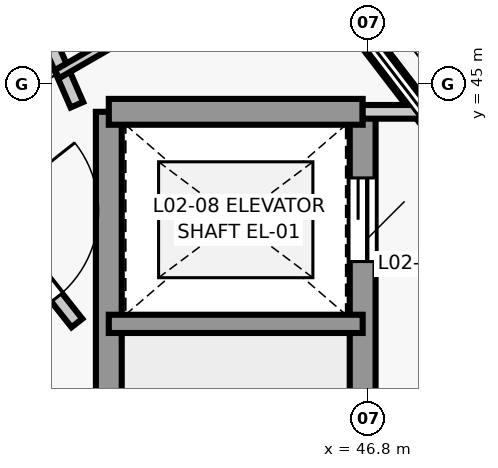
"""IFC4 building model, lengths in metres.
Left out: names, types, materials, properties, quantities, classifications, styles, units other than length and angle.
Written with IfcOpenShell. Run it as: python <this file> out.ifc"""

import sys

from ifc_helpers import new_model, si_unit, direction, frame, frame_2d, origin, place, context, subcontext, project, spatial, rectangle, extrude, element, fill, save


model = new_model("IFC4")
c1 = context("Model", 3, precision=1e-05, world=origin(), true_north=direction((0.0, 1.0)))
c2 = subcontext(c1, "Body", "Model", "MODEL_VIEW")
j1 = project(units=[si_unit("LENGTHUNIT", "METRE"), si_unit("PLANEANGLEUNIT", "RADIAN")], contexts=[c1])
p1 = place(None, origin())
s1 = spatial("IfcSite", under=j1, at=p1, CompositionType="ELEMENT")
p2 = place(p1, origin())
s2 = spatial("IfcBuilding", under=s1, at=p2, CompositionType="ELEMENT")
p3 = place(p2, frame((0.0, 0.0, 8.7)))
s3 = spatial("IfcBuildingStorey", under=s2, at=p3, CompositionType="ELEMENT", Elevation=8.7)
p4 = place(p3, frame((45.042, 33.371, 0.0), z_axis=(0.0, 0.0, 1.0), x_axis=(-0.608753590889, 0.79335935463, 0.0)))
e1 = element("IfcWall", 1, at=p4, inside=s3, PredefinedType="STANDARD", context=c2, shape_type="SweptSolid", body=[
    extrude(rectangle(XDim=10.852, YDim=0.28, at=frame_2d((5.426, 0.0))), origin(), (0.0, 0.0, 1.0), 0.82),
])
p5 = place(p3, frame((45.999, 46.62, 0.0), z_axis=(0.0, 0.0, 1.0), x_axis=(0.608769580289, -0.793347085527, 0.0)))
e2 = element("IfcWall", 2, at=p5, inside=s3, PredefinedType="STANDARD", context=c2, shape_type="SweptSolid", body=[
    extrude(rectangle(XDim=9.005, YDim=0.25, at=frame_2d((4.502, 0.0))), origin(), (0.0, 0.0, 1.0), 0.82),
])
p6 = place(p3, frame((46.731, 44.63, 0.0), z_axis=(0.0, 0.0, 1.0), x_axis=(0.0, -1.0, 0.0)))
e3 = element("IfcWall", 3, at=p6, inside=s3, PredefinedType="SHEAR", context=c2, shape_type="SweptSolid", body=[
    extrude(rectangle(XDim=9.73, YDim=0.34, at=frame_2d((4.865, 0.0))), origin(), (0.0, 0.0, 1.0), 3.9),
])
p7 = place(p6, frame((8.265, 0.0, 0.0)))
e4 = element("IfcOpeningElement", 4, at=p7, cuts=e3, PredefinedType="OPENING", context=c2, shape_type="SweptSolid", body=[
    extrude(rectangle(XDim=1.15, YDim=2.15, at=frame_2d((0.575, 1.075))), frame((0.0, 0.18, 0.0), z_axis=(0.0, -1.0, 0.0), x_axis=(1.0, 0.0, 0.0)), (0.0, 0.0, 1.0), 0.36),
])
p8 = place(p6, frame((0.87, 0.0, 0.0)))
e5 = element("IfcOpeningElement", 5, at=p8, cuts=e3, PredefinedType="OPENING", context=c2, shape_type="SweptSolid", body=[
    extrude(rectangle(XDim=1.1, YDim=2.15, at=frame_2d((0.55, 1.075))), frame((0.0, 0.18, 0.0), z_axis=(0.0, -1.0, 0.0), x_axis=(1.0, 0.0, 0.0)), (0.0, 0.0, 1.0), 0.36),
])
p9 = place(p3, frame((43.391, 34.9, 0.0), z_axis=(0.0, 0.0, 1.0), x_axis=(0.0, 1.0, 0.0)))
e6 = element("IfcWall", 6, at=p9, inside=s3, PredefinedType="SHEAR", context=c2, shape_type="SweptSolid", body=[
    extrude(rectangle(XDim=9.73, YDim=0.34, at=frame_2d((4.865, 0.0))), origin(), (0.0, 0.0, 1.0), 3.9),
])
p10 = place(p3, frame((43.391, 44.63, 0.0), z_axis=(0.0, 0.0, 1.0), x_axis=(1.0, 0.0, 0.0)))
e7 = element("IfcWall", 7, at=p10, inside=s3, PredefinedType="SHEAR", context=c2, shape_type="SweptSolid", body=[
    extrude(rectangle(XDim=3.34, YDim=0.34, at=frame_2d((1.67, 0.0))), origin(), (0.0, 0.0, 1.0), 3.9),
])
p11 = place(p3, frame((46.731, 41.84, 0.0), z_axis=(0.0, 0.0, 1.0), x_axis=(-1.0, 0.0, 0.0)))
e8 = element("IfcWall", 8, at=p11, inside=s3, PredefinedType="SHEAR", context=c2, shape_type="SweptSolid", body=[
    extrude(rectangle(XDim=3.34, YDim=0.24, at=frame_2d((1.67, 0.0))), origin(), (0.0, 0.0, 1.0), 3.9),
])
p12 = place(p3, frame((46.731, 44.63, 0.0), z_axis=(0.0, 0.0, 1.0), x_axis=(1.0, 0.0, 0.0)))
e9 = element("IfcWall", 9, at=p12, inside=s3, PredefinedType="PARTITIONING", context=c2, shape_type="SweptSolid", body=[
    extrude(rectangle(XDim=2.25, YDim=0.18, at=frame_2d((1.125, 0.0))), origin(), (0.0, 0.0, 1.0), 3.495),
])
p13 = place(p3, frame((38.851, 54.189, 0.0), z_axis=(0.0, 0.0, 1.0), x_axis=(0.399047769042, -0.916930138027, 0.0)))
e10 = element("IfcWall", 10, at=p13, inside=s3, PredefinedType="PARTITIONING", context=c2, shape_type="SweptSolid", body=[
    extrude(rectangle(XDim=10.324, YDim=0.18, at=frame_2d((5.162, 0.0))), origin(), (0.0, 0.0, 1.0), 3.495),
])
p14 = place(p13, frame((4.412, 0.0, 0.0)))
e11 = element("IfcOpeningElement", 11, at=p14, cuts=e10, PredefinedType="OPENING", context=c2, shape_type="SweptSolid", body=[
    extrude(rectangle(XDim=1.5, YDim=2.15, at=frame_2d((0.75, 1.075))), frame((0.0, 0.1, 0.0), z_axis=(0.0, -1.0, 0.0), x_axis=(1.0, 0.0, 0.0)), (0.0, 0.0, 1.0), 0.2),
])
p15 = place(p3, frame((41.541, 43.66, 0.0), z_axis=(0.0, 0.0, 1.0), x_axis=(0.620100740375, -0.784522193304, 0.0)))
e12 = element("IfcWall", 12, at=p15, inside=s3, PredefinedType="PARTITIONING", context=c2, shape_type="SweptSolid", body=[
    extrude(rectangle(XDim=2.306, YDim=0.18, at=frame_2d((1.153, 0.0))), origin(), (0.0, 0.0, 1.0), 3.495),
])
p16 = place(p15, frame((0.428, 0.0, 0.0)))
e13 = element("IfcOpeningElement", 13, at=p16, cuts=e12, PredefinedType="OPENING", context=c2, shape_type="SweptSolid", body=[
    extrude(rectangle(XDim=1.45, YDim=2.2, at=frame_2d((0.725, 1.1))), frame((0.0, 0.1, 0.0), z_axis=(0.0, -1.0, 0.0), x_axis=(1.0, 0.0, 0.0)), (0.0, 0.0, 1.0), 0.2),
])
p17 = place(p3, frame((45.308, 46.625, 0.0), z_axis=(0.0, 0.0, 1.0), x_axis=(-0.866031096941, -0.499990139034, 0.0)))
e14 = element("IfcWall", 14, at=p17, inside=s3, PredefinedType="PARTITIONING", context=c2, shape_type="SweptSolid", body=[
    extrude(rectangle(XDim=3.0, YDim=0.12, at=frame_2d((1.5, 0.0))), origin(), (0.0, 0.0, 1.0), 2.857),
])
p18 = place(p8, origin())
e15 = element("IfcDoor", 15, at=p18, inside=s3, OperationType="SLIDING_TO_LEFT", PredefinedType="DOOR", context=c2, shape_type="SweptSolid", body=[
    extrude(rectangle(XDim=1.1, YDim=2.15, at=frame_2d((0.55, 1.075))), frame((0.0, 0.025, 0.0), z_axis=(0.0, -1.0, 0.0), x_axis=(1.0, 0.0, 0.0)), (0.0, 0.0, 1.0), 0.05),
])
fill(e5, e15)
p19 = place(p16, origin())
e16 = element("IfcDoor", 16, at=p19, inside=s3, OperationType="SINGLE_SWING_LEFT", PredefinedType="DOOR", context=c2, shape_type="SweptSolid", body=[
    extrude(rectangle(XDim=1.45, YDim=2.2, at=frame_2d((0.725, 1.1))), frame((0.0, 0.025, 0.0), z_axis=(0.0, -1.0, 0.0), x_axis=(1.0, 0.0, 0.0)), (0.0, 0.0, 1.0), 0.05),
])
fill(e13, e16)
save(model, sys.argv[1])
